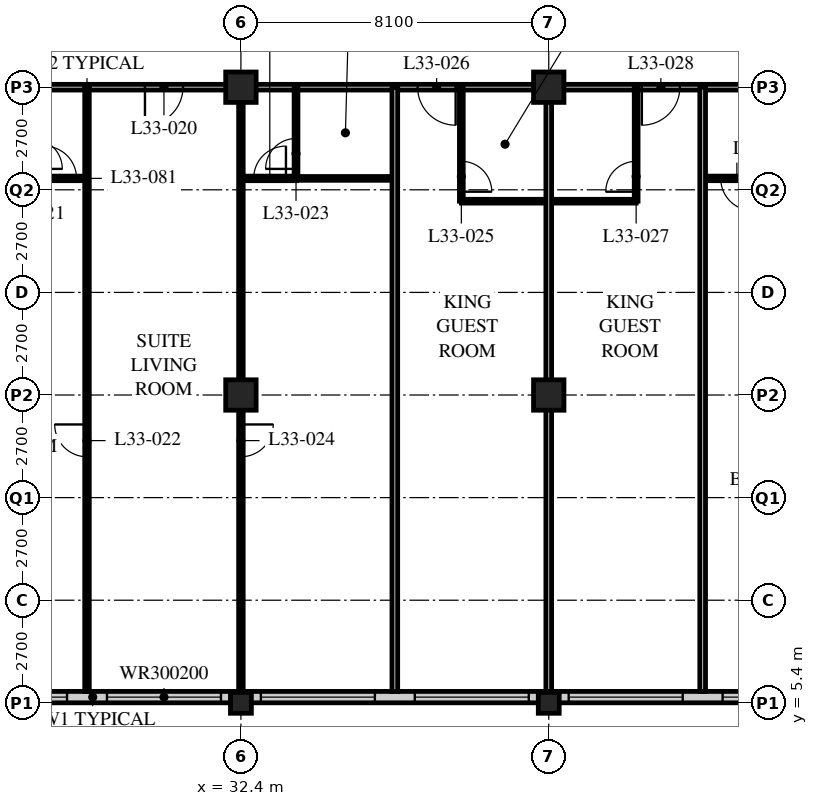
"""IFC4 building model, lengths in metres.
Left out: names, types, materials, properties, quantities, classifications, styles, units other than length and angle.
Written with IfcOpenShell. Run it as: python <this file> out.ifc"""

import sys

from ifc_helpers import new_model, si_unit, direction, frame, frame_2d, origin, origin_2d, place, context, subcontext, project, spatial, rectangle, hollow_rectangle, extrude, element, fill, save


model = new_model("IFC4")
c1 = context("Model", 3, precision=1e-05, world=origin(), true_north=direction((0.0, 1.0)))
c2 = subcontext(c1, "Body", "Model", "MODEL_VIEW")
j1 = project(units=[si_unit("LENGTHUNIT", "METRE"), si_unit("PLANEANGLEUNIT", "RADIAN")], contexts=[c1])
p1 = place(None, origin())
s1 = spatial("IfcSite", under=j1, at=p1, CompositionType="ELEMENT")
p2 = place(p1, origin())
s2 = spatial("IfcBuilding", under=s1, at=p2, CompositionType="ELEMENT")
p3 = place(p2, frame((0.0, 0.0, 130.6)))
s3 = spatial("IfcBuildingStorey", under=s2, at=p3, CompositionType="ELEMENT", Elevation=130.6)
p4 = place(p3, frame((32.4, 5.4, 0.0), z_axis=(0.0, 0.0, 1.0), x_axis=(1.0, 0.0, 0.0)))
e1 = element("IfcColumn", 1, at=p4, inside=s3, PredefinedType="COLUMN", context=c2, shape_type="SweptSolid", body=[
    extrude(hollow_rectangle(XDim=0.55, YDim=0.55, WallThickness=0.04, at=origin_2d()), origin(), (0.0, 0.0, 1.0), 3.4),
])
for number, where, z_axis, x_axis in (
    (2, (32.4, 13.5, 0.0), (0.0, 0.0, 1.0), (1.0, 0.0, 0.0)),
    (3, (32.4, 21.6, 0.0), (0.0, 0.0, 1.0), (1.0, 0.0, 0.0)),
):
    element("IfcColumn", number, at=place(p3, frame(where, z_axis=z_axis, x_axis=x_axis)), inside=s3, PredefinedType="COLUMN", context=c2, shape_type="SweptSolid", body=[
        extrude(hollow_rectangle(XDim=0.8, YDim=0.8, WallThickness=0.08, at=origin_2d()), origin(), (0.0, 0.0, 1.0), 3.4),
    ])
p5 = place(p3, frame((40.5, 5.4, 0.0), z_axis=(0.0, 0.0, 1.0), x_axis=(1.0, 0.0, 0.0)))
e4 = element("IfcColumn", 4, at=p5, inside=s3, PredefinedType="COLUMN", context=c2, shape_type="SweptSolid", body=[
    extrude(hollow_rectangle(XDim=0.55, YDim=0.55, WallThickness=0.04, at=origin_2d()), origin(), (0.0, 0.0, 1.0), 3.4),
])
for number, where, z_axis, x_axis in (
    (5, (40.5, 13.5, 0.0), (0.0, 0.0, 1.0), (1.0, 0.0, 0.0)),
    (6, (40.5, 21.6, 0.0), (0.0, 0.0, 1.0), (1.0, 0.0, 0.0)),
):
    element("IfcColumn", number, at=place(p3, frame(where, z_axis=z_axis, x_axis=x_axis)), inside=s3, PredefinedType="COLUMN", context=c2, shape_type="SweptSolid", body=[
        extrude(hollow_rectangle(XDim=0.8, YDim=0.8, WallThickness=0.08, at=origin_2d()), origin(), (0.0, 0.0, 1.0), 3.4),
    ])
p6 = place(p3, frame((8.4, 5.55, 0.0), z_axis=(0.0, 0.0, 1.0), x_axis=(1.0, 0.0, 0.0)))
e7 = element("IfcWall", 7, at=p6, inside=s3, PredefinedType="SOLIDWALL", context=c2, shape_type="SweptSolid", body=[
    extrude(rectangle(XDim=40.2, YDim=0.3, at=frame_2d((20.1, 0.0))), origin(), (0.0, 0.0, 1.0), 3.19),
])
p7 = place(p6, frame((0.225, 0.0, 0.9)))
e8 = element("IfcOpeningElement", 8, at=p7, cuts=e7, PredefinedType="OPENING", context=c2, shape_type="SweptSolid", body=[
    extrude(rectangle(XDim=3.0, YDim=2.0, at=frame_2d((1.5, 1.0))), frame((0.0, 0.16, 0.0), z_axis=(0.0, -1.0, 0.0), x_axis=(1.0, 0.0, 0.0)), (0.0, 0.0, 1.0), 0.32),
])
p8 = place(p6, frame((4.275, 0.0, 0.9)))
e9 = element("IfcOpeningElement", 9, at=p8, cuts=e7, PredefinedType="OPENING", context=c2, shape_type="SweptSolid", body=[
    extrude(rectangle(XDim=3.0, YDim=2.0, at=frame_2d((1.5, 1.0))), frame((0.0, 0.16, 0.0), z_axis=(0.0, -1.0, 0.0), x_axis=(1.0, 0.0, 0.0)), (0.0, 0.0, 1.0), 0.32),
])
p9 = place(p6, frame((8.325, 0.0, 0.9)))
e10 = element("IfcOpeningElement", 10, at=p9, cuts=e7, PredefinedType="OPENING", context=c2, shape_type="SweptSolid", body=[
    extrude(rectangle(XDim=3.0, YDim=2.0, at=frame_2d((1.5, 1.0))), frame((0.0, 0.16, 0.0), z_axis=(0.0, -1.0, 0.0), x_axis=(1.0, 0.0, 0.0)), (0.0, 0.0, 1.0), 0.32),
])
p10 = place(p6, frame((12.375, 0.0, 0.9)))
e11 = element("IfcOpeningElement", 11, at=p10, cuts=e7, PredefinedType="OPENING", context=c2, shape_type="SweptSolid", body=[
    extrude(rectangle(XDim=3.0, YDim=2.0, at=frame_2d((1.5, 1.0))), frame((0.0, 0.16, 0.0), z_axis=(0.0, -1.0, 0.0), x_axis=(1.0, 0.0, 0.0)), (0.0, 0.0, 1.0), 0.32),
])
p11 = place(p6, frame((16.425, 0.0, 0.9)))
e12 = element("IfcOpeningElement", 12, at=p11, cuts=e7, PredefinedType="OPENING", context=c2, shape_type="SweptSolid", body=[
    extrude(rectangle(XDim=3.0, YDim=2.0, at=frame_2d((1.5, 1.0))), frame((0.0, 0.16, 0.0), z_axis=(0.0, -1.0, 0.0), x_axis=(1.0, 0.0, 0.0)), (0.0, 0.0, 1.0), 0.32),
])
p12 = place(p6, frame((20.475, 0.0, 0.9)))
e13 = element("IfcOpeningElement", 13, at=p12, cuts=e7, PredefinedType="OPENING", context=c2, shape_type="SweptSolid", body=[
    extrude(rectangle(XDim=3.0, YDim=2.0, at=frame_2d((1.5, 1.0))), frame((0.0, 0.16, 0.0), z_axis=(0.0, -1.0, 0.0), x_axis=(1.0, 0.0, 0.0)), (0.0, 0.0, 1.0), 0.32),
])
p13 = place(p6, frame((24.525, 0.0, 0.9)))
e14 = element("IfcOpeningElement", 14, at=p13, cuts=e7, PredefinedType="OPENING", context=c2, shape_type="SweptSolid", body=[
    extrude(rectangle(XDim=3.0, YDim=2.0, at=frame_2d((1.5, 1.0))), frame((0.0, 0.16, 0.0), z_axis=(0.0, -1.0, 0.0), x_axis=(1.0, 0.0, 0.0)), (0.0, 0.0, 1.0), 0.32),
])
p14 = place(p6, frame((28.575, 0.0, 0.9)))
e15 = element("IfcOpeningElement", 15, at=p14, cuts=e7, PredefinedType="OPENING", context=c2, shape_type="SweptSolid", body=[
    extrude(rectangle(XDim=3.0, YDim=2.0, at=frame_2d((1.5, 1.0))), frame((0.0, 0.16, 0.0), z_axis=(0.0, -1.0, 0.0), x_axis=(1.0, 0.0, 0.0)), (0.0, 0.0, 1.0), 0.32),
])
p15 = place(p6, frame((32.625, 0.0, 0.9)))
e16 = element("IfcOpeningElement", 16, at=p15, cuts=e7, PredefinedType="OPENING", context=c2, shape_type="SweptSolid", body=[
    extrude(rectangle(XDim=3.0, YDim=2.0, at=frame_2d((1.5, 1.0))), frame((0.0, 0.16, 0.0), z_axis=(0.0, -1.0, 0.0), x_axis=(1.0, 0.0, 0.0)), (0.0, 0.0, 1.0), 0.32),
])
p16 = place(p6, frame((36.675, 0.0, 0.9)))
e17 = element("IfcOpeningElement", 17, at=p16, cuts=e7, PredefinedType="OPENING", context=c2, shape_type="SweptSolid", body=[
    extrude(rectangle(XDim=3.0, YDim=2.0, at=frame_2d((1.5, 1.0))), frame((0.0, 0.16, 0.0), z_axis=(0.0, -1.0, 0.0), x_axis=(1.0, 0.0, 0.0)), (0.0, 0.0, 1.0), 0.32),
])
p17 = place(p3, frame((8.1, 21.6, 0.0), z_axis=(0.0, 0.0, 1.0), x_axis=(1.0, 0.0, 0.0)))
e18 = element("IfcWall", 18, at=p17, inside=s3, PredefinedType="PARTITIONING", context=c2, shape_type="SweptSolid", body=[
    extrude(rectangle(XDim=40.5, YDim=0.15, at=frame_2d((20.25, 0.0))), origin(), (0.0, 0.0, 1.0), 2.578),
])
p18 = place(p17, frame((9.625, 0.0, 0.0)))
e19 = element("IfcOpeningElement", 19, at=p18, cuts=e18, PredefinedType="OPENING", context=c2, shape_type="SweptSolid", body=[
    extrude(rectangle(XDim=1.0, YDim=2.1, at=frame_2d((0.5, 1.05))), frame((0.0, 0.085, 0.0), z_axis=(0.0, -1.0, 0.0), x_axis=(1.0, 0.0, 0.0)), (0.0, 0.0, 1.0), 0.17),
])
p19 = place(p17, frame((21.775, 0.0, 0.0)))
e20 = element("IfcOpeningElement", 20, at=p19, cuts=e18, PredefinedType="OPENING", context=c2, shape_type="SweptSolid", body=[
    extrude(rectangle(XDim=1.0, YDim=2.1, at=frame_2d((0.5, 1.05))), frame((0.0, 0.085, 0.0), z_axis=(0.0, -1.0, 0.0), x_axis=(1.0, 0.0, 0.0)), (0.0, 0.0, 1.0), 0.17),
])
p20 = place(p17, frame((28.95, 0.0, 0.0)))
e21 = element("IfcOpeningElement", 21, at=p20, cuts=e18, PredefinedType="OPENING", context=c2, shape_type="SweptSolid", body=[
    extrude(rectangle(XDim=1.0, YDim=2.1, at=frame_2d((0.5, 1.05))), frame((0.0, 0.085, 0.0), z_axis=(0.0, -1.0, 0.0), x_axis=(1.0, 0.0, 0.0)), (0.0, 0.0, 1.0), 0.17),
])
p21 = place(p17, frame((34.85, 0.0, 0.0)))
e22 = element("IfcOpeningElement", 22, at=p21, cuts=e18, PredefinedType="OPENING", context=c2, shape_type="SweptSolid", body=[
    extrude(rectangle(XDim=1.0, YDim=2.1, at=frame_2d((0.5, 1.05))), frame((0.0, 0.085, 0.0), z_axis=(0.0, -1.0, 0.0), x_axis=(1.0, 0.0, 0.0)), (0.0, 0.0, 1.0), 0.17),
])
p22 = place(p17, frame((1.525, 0.0, 0.0)))
e23 = element("IfcOpeningElement", 23, at=p22, cuts=e18, PredefinedType="OPENING", context=c2, shape_type="SweptSolid", body=[
    extrude(rectangle(XDim=1.0, YDim=2.1, at=frame_2d((0.5, 1.05))), frame((0.0, 0.085, 0.0), z_axis=(0.0, -1.0, 0.0), x_axis=(1.0, 0.0, 0.0)), (0.0, 0.0, 1.0), 0.17),
])
p23 = place(p17, frame((37.975, 0.0, 0.0)))
e24 = element("IfcOpeningElement", 24, at=p23, cuts=e18, PredefinedType="OPENING", context=c2, shape_type="SweptSolid", body=[
    extrude(rectangle(XDim=1.0, YDim=2.1, at=frame_2d((0.5, 1.05))), frame((0.0, 0.085, 0.0), z_axis=(0.0, -1.0, 0.0), x_axis=(1.0, 0.0, 0.0)), (0.0, 0.0, 1.0), 0.17),
])
p24 = place(p3, frame((28.35, 21.6, 0.0), z_axis=(0.0, 0.0, 1.0), x_axis=(0.0, -1.0, 0.0)))
e25 = element("IfcWall", 25, at=p24, inside=s3, PredefinedType="PARTITIONING", context=c2, shape_type="SweptSolid", body=[
    extrude(rectangle(XDim=15.9, YDim=0.12, at=frame_2d((7.95, 0.0))), origin(), (0.0, 0.0, 1.0), 3.19),
])
p25 = place(p24, frame((8.875, 0.0, 0.0)))
e26 = element("IfcOpeningElement", 26, at=p25, cuts=e25, PredefinedType="OPENING", context=c2, shape_type="SweptSolid", body=[
    extrude(rectangle(XDim=0.85, YDim=2.1, at=frame_2d((0.425, 1.05))), frame((0.0, 0.07, 0.0), z_axis=(0.0, -1.0, 0.0), x_axis=(1.0, 0.0, 0.0)), (0.0, 0.0, 1.0), 0.14),
])
p26 = place(p3, frame((33.85, 19.2, 0.0), z_axis=(0.0, 0.0, 1.0), x_axis=(1.0, 0.0, 0.0)))
e27 = element("IfcWall", 27, at=p26, inside=s3, PredefinedType="PARTITIONING", context=c2, shape_type="SweptSolid", body=[
    extrude(rectangle(XDim=2.6, YDim=0.1, at=frame_2d((1.3, 0.0))), origin(), (0.0, 0.0, 1.0), 3.19),
])
p27 = place(p3, frame((33.85, 21.6, 0.0), z_axis=(0.0, 0.0, 1.0), x_axis=(0.0, -1.0, 0.0)))
e28 = element("IfcWall", 28, at=p27, inside=s3, PredefinedType="PARTITIONING", context=c2, shape_type="SweptSolid", body=[
    extrude(rectangle(XDim=2.4, YDim=0.1, at=frame_2d((1.2, 0.0))), origin(), (0.0, 0.0, 1.0), 3.19),
])
p28 = place(p27, frame((1.35, 0.0, 0.0)))
e29 = element("IfcOpeningElement", 29, at=p28, cuts=e28, PredefinedType="OPENING", context=c2, shape_type="SweptSolid", body=[
    extrude(rectangle(XDim=0.8, YDim=2.1, at=frame_2d((0.4, 1.05))), frame((0.0, 0.06, 0.0), z_axis=(0.0, -1.0, 0.0), x_axis=(1.0, 0.0, 0.0)), (0.0, 0.0, 1.0), 0.12),
])
p29 = place(p3, frame((32.4, 21.6, 0.0), z_axis=(0.0, 0.0, 1.0), x_axis=(0.0, -1.0, 0.0)))
e30 = element("IfcWall", 30, at=p29, inside=s3, PredefinedType="PARTITIONING", context=c2, shape_type="SweptSolid", body=[
    extrude(rectangle(XDim=15.9, YDim=0.12, at=frame_2d((7.95, 0.0))), origin(), (0.0, 0.0, 1.0), 2.578),
])
p30 = place(p29, frame((8.875, 0.0, 0.0)))
e31 = element("IfcOpeningElement", 31, at=p30, cuts=e30, PredefinedType="OPENING", context=c2, shape_type="SweptSolid", body=[
    extrude(rectangle(XDim=0.85, YDim=2.1, at=frame_2d((0.425, 1.05))), frame((0.0, 0.07, 0.0), z_axis=(0.0, -1.0, 0.0), x_axis=(1.0, 0.0, 0.0)), (0.0, 0.0, 1.0), 0.14),
])
p31 = place(p3, frame((36.45, 21.6, 0.0), z_axis=(0.0, 0.0, 1.0), x_axis=(0.0, -1.0, 0.0)))
e32 = element("IfcWall", 32, at=p31, inside=s3, PredefinedType="PARTITIONING", context=c2, shape_type="SweptSolid", body=[
    extrude(rectangle(XDim=15.9, YDim=0.15, at=frame_2d((7.95, 0.0))), origin(), (0.0, 0.0, 1.0), 3.19),
])
p32 = place(p3, frame((38.2, 18.6, 0.0), z_axis=(0.0, 0.0, 1.0), x_axis=(1.0, 0.0, 0.0)))
e33 = element("IfcWall", 33, at=p32, inside=s3, PredefinedType="PARTITIONING", context=c2, shape_type="SweptSolid", body=[
    extrude(rectangle(XDim=4.6, YDim=0.1, at=frame_2d((2.3, 0.0))), origin(), (0.0, 0.0, 1.0), 3.19),
])
p33 = place(p3, frame((38.2, 21.6, 0.0), z_axis=(0.0, 0.0, 1.0), x_axis=(0.0, -1.0, 0.0)))
e34 = element("IfcWall", 34, at=p33, inside=s3, PredefinedType="PARTITIONING", context=c2, shape_type="SweptSolid", body=[
    extrude(rectangle(XDim=3.0, YDim=0.1, at=frame_2d((1.5, 0.0))), origin(), (0.0, 0.0, 1.0), 3.19),
])
p34 = place(p33, frame((1.95, 0.0, 0.0)))
e35 = element("IfcOpeningElement", 35, at=p34, cuts=e34, PredefinedType="OPENING", context=c2, shape_type="SweptSolid", body=[
    extrude(rectangle(XDim=0.8, YDim=2.1, at=frame_2d((0.4, 1.05))), frame((0.0, 0.06, 0.0), z_axis=(0.0, -1.0, 0.0), x_axis=(1.0, 0.0, 0.0)), (0.0, 0.0, 1.0), 0.12),
])
p35 = place(p3, frame((40.5, 21.6, 0.0), z_axis=(0.0, 0.0, 1.0), x_axis=(0.0, -1.0, 0.0)))
e36 = element("IfcWall", 36, at=p35, inside=s3, PredefinedType="PARTITIONING", context=c2, shape_type="SweptSolid", body=[
    extrude(rectangle(XDim=15.9, YDim=0.15, at=frame_2d((7.95, 0.0))), origin(), (0.0, 0.0, 1.0), 2.578),
])
p36 = place(p3, frame((42.8, 21.6, 0.0), z_axis=(0.0, 0.0, 1.0), x_axis=(0.0, -1.0, 0.0)))
e37 = element("IfcWall", 37, at=p36, inside=s3, PredefinedType="PARTITIONING", context=c2, shape_type="SweptSolid", body=[
    extrude(rectangle(XDim=3.0, YDim=0.1, at=frame_2d((1.5, 0.0))), origin(), (0.0, 0.0, 1.0), 3.19),
])
p37 = place(p36, frame((1.95, 0.0, 0.0)))
e38 = element("IfcOpeningElement", 38, at=p37, cuts=e37, PredefinedType="OPENING", context=c2, shape_type="SweptSolid", body=[
    extrude(rectangle(XDim=0.8, YDim=2.1, at=frame_2d((0.4, 1.05))), frame((0.0, 0.06, 0.0), z_axis=(0.0, -1.0, 0.0), x_axis=(1.0, 0.0, 0.0)), (0.0, 0.0, 1.0), 0.12),
])
p38 = place(p3, frame((44.55, 19.2, 0.0), z_axis=(0.0, 0.0, 1.0), x_axis=(1.0, 0.0, 0.0)))
e39 = element("IfcWall", 39, at=p38, inside=s3, PredefinedType="PARTITIONING", context=c2, shape_type="SweptSolid", body=[
    extrude(rectangle(XDim=8.05, YDim=0.12, at=frame_2d((4.025, 0.0))), origin(), (0.0, 0.0, 1.0), 3.19),
])
p39 = place(p38, frame((0.475, 0.0, 0.0)))
e40 = element("IfcOpeningElement", 40, at=p39, cuts=e39, PredefinedType="OPENING", context=c2, shape_type="SweptSolid", body=[
    extrude(rectangle(XDim=0.85, YDim=2.1, at=frame_2d((0.425, 1.05))), frame((0.0, 0.07, 0.0), z_axis=(0.0, -1.0, 0.0), x_axis=(1.0, 0.0, 0.0)), (0.0, 0.0, 1.0), 0.14),
])
p40 = place(p38, frame((4.325, 0.0, 0.0)))
e41 = element("IfcOpeningElement", 41, at=p40, cuts=e39, PredefinedType="OPENING", context=c2, shape_type="SweptSolid", body=[
    extrude(rectangle(XDim=0.85, YDim=2.1, at=frame_2d((0.425, 1.05))), frame((0.0, 0.07, 0.0), z_axis=(0.0, -1.0, 0.0), x_axis=(1.0, 0.0, 0.0)), (0.0, 0.0, 1.0), 0.14),
])
p41 = place(p3, frame((44.55, 21.6, 0.0), z_axis=(0.0, 0.0, 1.0), x_axis=(0.0, -1.0, 0.0)))
e42 = element("IfcWall", 42, at=p41, inside=s3, PredefinedType="PARTITIONING", context=c2, shape_type="SweptSolid", body=[
    extrude(rectangle(XDim=15.9, YDim=0.15, at=frame_2d((7.95, 0.0))), origin(), (0.0, 0.0, 1.0), 3.19),
])
p42 = place(p3, frame((28.35, 19.2, 0.0), z_axis=(0.0, 0.0, 1.0), x_axis=(-1.0, 0.0, 0.0)))
e43 = element("IfcWall", 43, at=p42, inside=s3, PredefinedType="PARTITIONING", context=c2, shape_type="SweptSolid", body=[
    extrude(rectangle(XDim=1.46, YDim=0.12, at=frame_2d((0.73, 0.0))), origin(), (0.0, 0.0, 1.0), 3.19),
])
p43 = place(p42, frame((0.275, 0.0, 0.0)))
e44 = element("IfcOpeningElement", 44, at=p43, cuts=e43, PredefinedType="OPENING", context=c2, shape_type="SweptSolid", body=[
    extrude(rectangle(XDim=0.85, YDim=2.1, at=frame_2d((0.425, 1.05))), frame((0.0, 0.07, 0.0), z_axis=(0.0, -1.0, 0.0), x_axis=(1.0, 0.0, 0.0)), (0.0, 0.0, 1.0), 0.14),
])
p44 = place(p3, frame((33.86, 19.2, 0.0), z_axis=(0.0, 0.0, 1.0), x_axis=(-1.0, 0.0, 0.0)))
e45 = element("IfcWall", 45, at=p44, inside=s3, PredefinedType="PARTITIONING", context=c2, shape_type="SweptSolid", body=[
    extrude(rectangle(XDim=1.46, YDim=0.12, at=frame_2d((0.73, 0.0))), origin(), (0.0, 0.0, 1.0), 3.19),
])
p45 = place(p44, frame((0.275, 0.0, 0.0)))
e46 = element("IfcOpeningElement", 46, at=p45, cuts=e45, PredefinedType="OPENING", context=c2, shape_type="SweptSolid", body=[
    extrude(rectangle(XDim=0.85, YDim=2.1, at=frame_2d((0.425, 1.05))), frame((0.0, 0.07, 0.0), z_axis=(0.0, -1.0, 0.0), x_axis=(1.0, 0.0, 0.0)), (0.0, 0.0, 1.0), 0.14),
])
p46 = place(p11, origin())
e47 = element("IfcWindow", 47, at=p46, inside=s3, PartitioningType="SINGLE_PANEL", PredefinedType="WINDOW", context=c2, shape_type="SweptSolid", body=[
    extrude(rectangle(XDim=3.0, YDim=2.0, at=frame_2d((1.5, 1.0))), frame((0.0, 0.03, 0.0), z_axis=(0.0, -1.0, 0.0), x_axis=(1.0, 0.0, 0.0)), (0.0, 0.0, 1.0), 0.06),
])
fill(e12, e47)
p47 = place(p12, origin())
e48 = element("IfcWindow", 48, at=p47, inside=s3, PartitioningType="SINGLE_PANEL", PredefinedType="WINDOW", context=c2, shape_type="SweptSolid", body=[
    extrude(rectangle(XDim=3.0, YDim=2.0, at=frame_2d((1.5, 1.0))), frame((0.0, 0.03, 0.0), z_axis=(0.0, -1.0, 0.0), x_axis=(1.0, 0.0, 0.0)), (0.0, 0.0, 1.0), 0.06),
])
fill(e13, e48)
p48 = place(p13, origin())
e49 = element("IfcWindow", 49, at=p48, inside=s3, PartitioningType="SINGLE_PANEL", PredefinedType="WINDOW", context=c2, shape_type="SweptSolid", body=[
    extrude(rectangle(XDim=3.0, YDim=2.0, at=frame_2d((1.5, 1.0))), frame((0.0, 0.03, 0.0), z_axis=(0.0, -1.0, 0.0), x_axis=(1.0, 0.0, 0.0)), (0.0, 0.0, 1.0), 0.06),
])
fill(e14, e49)
p49 = place(p14, origin())
e50 = element("IfcWindow", 50, at=p49, inside=s3, PartitioningType="SINGLE_PANEL", PredefinedType="WINDOW", context=c2, shape_type="SweptSolid", body=[
    extrude(rectangle(XDim=3.0, YDim=2.0, at=frame_2d((1.5, 1.0))), frame((0.0, 0.03, 0.0), z_axis=(0.0, -1.0, 0.0), x_axis=(1.0, 0.0, 0.0)), (0.0, 0.0, 1.0), 0.06),
])
fill(e15, e50)
p50 = place(p15, origin())
e51 = element("IfcWindow", 51, at=p50, inside=s3, PartitioningType="SINGLE_PANEL", PredefinedType="WINDOW", context=c2, shape_type="SweptSolid", body=[
    extrude(rectangle(XDim=3.0, YDim=2.0, at=frame_2d((1.5, 1.0))), frame((0.0, 0.03, 0.0), z_axis=(0.0, -1.0, 0.0), x_axis=(1.0, 0.0, 0.0)), (0.0, 0.0, 1.0), 0.06),
])
fill(e16, e51)
p51 = place(p16, origin())
e52 = element("IfcWindow", 52, at=p51, inside=s3, PartitioningType="SINGLE_PANEL", PredefinedType="WINDOW", context=c2, shape_type="SweptSolid", body=[
    extrude(rectangle(XDim=3.0, YDim=2.0, at=frame_2d((1.5, 1.0))), frame((0.0, 0.03, 0.0), z_axis=(0.0, -1.0, 0.0), x_axis=(1.0, 0.0, 0.0)), (0.0, 0.0, 1.0), 0.06),
])
fill(e17, e52)
p52 = place(p19, origin())
e53 = element("IfcDoor", 53, at=p52, inside=s3, OperationType="SINGLE_SWING_RIGHT", PredefinedType="DOOR", context=c2, shape_type="SweptSolid", body=[
    extrude(rectangle(XDim=1.0, YDim=2.1, at=frame_2d((0.5, 1.05))), frame((0.0, 0.025, 0.0), z_axis=(0.0, -1.0, 0.0), x_axis=(1.0, 0.0, 0.0)), (0.0, 0.0, 1.0), 0.05),
])
fill(e20, e53)
p53 = place(p25, origin())
e54 = element("IfcDoor", 54, at=p53, inside=s3, OperationType="SINGLE_SWING_RIGHT", PredefinedType="DOOR", context=c2, shape_type="SweptSolid", body=[
    extrude(rectangle(XDim=0.85, YDim=2.1, at=frame_2d((0.425, 1.05))), frame((0.0, 0.025, 0.0), z_axis=(0.0, -1.0, 0.0), x_axis=(1.0, 0.0, 0.0)), (0.0, 0.0, 1.0), 0.05),
])
fill(e26, e54)
p54 = place(p28, origin())
e55 = element("IfcDoor", 55, at=p54, inside=s3, OperationType="SINGLE_SWING_LEFT", PredefinedType="DOOR", context=c2, shape_type="SweptSolid", body=[
    extrude(rectangle(XDim=0.8, YDim=2.1, at=frame_2d((0.4, 1.05))), frame((0.0, 0.025, 0.0), z_axis=(0.0, -1.0, 0.0), x_axis=(1.0, 0.0, 0.0)), (0.0, 0.0, 1.0), 0.05),
])
fill(e29, e55)
p55 = place(p30, origin())
e56 = element("IfcDoor", 56, at=p55, inside=s3, OperationType="SINGLE_SWING_LEFT", PredefinedType="DOOR", context=c2, shape_type="SweptSolid", body=[
    extrude(rectangle(XDim=0.85, YDim=2.1, at=frame_2d((0.425, 1.05))), frame((0.0, 0.025, 0.0), z_axis=(0.0, -1.0, 0.0), x_axis=(1.0, 0.0, 0.0)), (0.0, 0.0, 1.0), 0.05),
])
fill(e31, e56)
p56 = place(p34, origin())
e57 = element("IfcDoor", 57, at=p56, inside=s3, OperationType="SINGLE_SWING_RIGHT", PredefinedType="DOOR", context=c2, shape_type="SweptSolid", body=[
    extrude(rectangle(XDim=0.8, YDim=2.1, at=frame_2d((0.4, 1.05))), frame((0.0, 0.025, 0.0), z_axis=(0.0, -1.0, 0.0), x_axis=(1.0, 0.0, 0.0)), (0.0, 0.0, 1.0), 0.05),
])
fill(e35, e57)
p57 = place(p20, origin())
e58 = element("IfcDoor", 58, at=p57, inside=s3, OperationType="SINGLE_SWING_LEFT", PredefinedType="DOOR", context=c2, shape_type="SweptSolid", body=[
    extrude(rectangle(XDim=1.0, YDim=2.1, at=frame_2d((0.5, 1.05))), frame((0.0, 0.025, 0.0), z_axis=(0.0, -1.0, 0.0), x_axis=(1.0, 0.0, 0.0)), (0.0, 0.0, 1.0), 0.05),
])
fill(e21, e58)
p58 = place(p37, origin())
e59 = element("IfcDoor", 59, at=p58, inside=s3, OperationType="SINGLE_SWING_LEFT", PredefinedType="DOOR", context=c2, shape_type="SweptSolid", body=[
    extrude(rectangle(XDim=0.8, YDim=2.1, at=frame_2d((0.4, 1.05))), frame((0.0, 0.025, 0.0), z_axis=(0.0, -1.0, 0.0), x_axis=(1.0, 0.0, 0.0)), (0.0, 0.0, 1.0), 0.05),
])
fill(e38, e59)
p59 = place(p21, origin())
e60 = element("IfcDoor", 60, at=p59, inside=s3, OperationType="SINGLE_SWING_RIGHT", PredefinedType="DOOR", context=c2, shape_type="SweptSolid", body=[
    extrude(rectangle(XDim=1.0, YDim=2.1, at=frame_2d((0.5, 1.05))), frame((0.0, 0.025, 0.0), z_axis=(0.0, -1.0, 0.0), x_axis=(1.0, 0.0, 0.0)), (0.0, 0.0, 1.0), 0.05),
])
fill(e22, e60)
p60 = place(p39, origin())
e61 = element("IfcDoor", 61, at=p60, inside=s3, OperationType="SINGLE_SWING_LEFT", PredefinedType="DOOR", context=c2, shape_type="SweptSolid", body=[
    extrude(rectangle(XDim=0.85, YDim=2.1, at=frame_2d((0.425, 1.05))), frame((0.0, 0.025, 0.0), z_axis=(0.0, -1.0, 0.0), x_axis=(1.0, 0.0, 0.0)), (0.0, 0.0, 1.0), 0.05),
])
fill(e40, e61)
p61 = place(p43, origin())
e62 = element("IfcDoor", 62, at=p61, inside=s3, OperationType="SINGLE_SWING_LEFT", PredefinedType="DOOR", context=c2, shape_type="SweptSolid", body=[
    extrude(rectangle(XDim=0.85, YDim=2.1, at=frame_2d((0.425, 1.05))), frame((0.0, 0.025, 0.0), z_axis=(0.0, -1.0, 0.0), x_axis=(1.0, 0.0, 0.0)), (0.0, 0.0, 1.0), 0.05),
])
fill(e44, e62)
p62 = place(p45, origin())
e63 = element("IfcDoor", 63, at=p62, inside=s3, OperationType="SINGLE_SWING_RIGHT", PredefinedType="DOOR", context=c2, shape_type="SweptSolid", body=[
    extrude(rectangle(XDim=0.85, YDim=2.1, at=frame_2d((0.425, 1.05))), frame((0.0, 0.025, 0.0), z_axis=(0.0, -1.0, 0.0), x_axis=(1.0, 0.0, 0.0)), (0.0, 0.0, 1.0), 0.05),
])
fill(e46, e63)
save(model, sys.argv[1])
